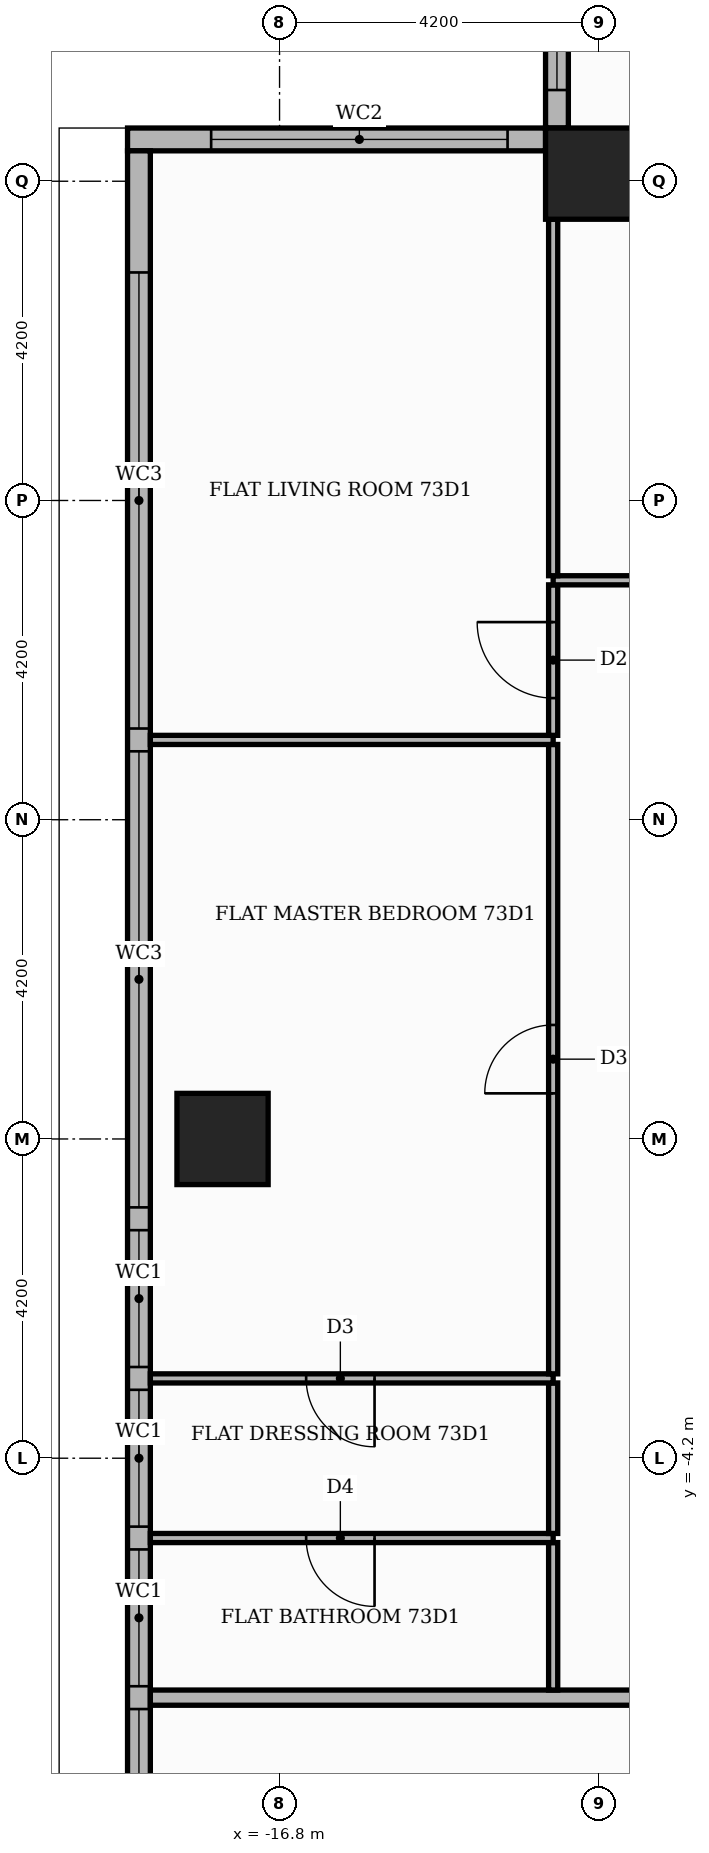
"""IFC4 building model, lengths in metres.
Left out: names, types, materials, properties, quantities, classifications, styles, units other than length and angle.
Written with IfcOpenShell. Run it as: python <this file> out.ifc"""

import sys

from ifc_helpers import new_model, si_unit, direction, frame, frame_2d, origin, origin_2d, place, context, subcontext, project, spatial, rectangle, extrude, element, fill, save


model = new_model("IFC4")
c1 = context("Model", 3, precision=1e-05, world=origin(), true_north=direction((0.0, 1.0)))
c2 = subcontext(c1, "Body", "Model", "MODEL_VIEW")
j1 = project(units=[si_unit("LENGTHUNIT", "METRE"), si_unit("PLANEANGLEUNIT", "RADIAN")], contexts=[c1])
p1 = place(None, origin())
s1 = spatial("IfcSite", under=j1, at=p1, CompositionType="ELEMENT")
p2 = place(p1, origin())
s2 = spatial("IfcBuilding", under=s1, at=p2, CompositionType="ELEMENT")
p3 = place(p2, frame((0.0, 0.0, 304.5)))
s3 = spatial("IfcBuildingStorey", under=s2, at=p3, CompositionType="ELEMENT", Elevation=304.5)
for number, where, z_axis, x_axis in (
    (1, (-17.55, 0.0, 0.0), (0.0, 0.0, 1.0), (1.0, 0.0, 0.0)),
    (2, (-12.7, 12.7, 0.0), (0.0, 0.0, 1.0), (1.0, 0.0, 0.0)),
):
    element("IfcColumn", number, at=place(p3, frame(where, z_axis=z_axis, x_axis=x_axis)), inside=s3, PredefinedType="COLUMN", context=c2, shape_type="SweptSolid", body=[
        extrude(rectangle(XDim=1.2, YDim=1.2, at=origin_2d()), origin(), (0.0, 0.0, 1.0), 3.9),
    ])
p4 = place(p3, frame((-13.15, 18.5, 0.0), z_axis=(0.0, 0.0, 1.0), x_axis=(0.0, -1.0, 0.0)))
e3 = element("IfcWall", 3, at=p4, inside=s3, PredefinedType="STANDARD", context=c2, shape_type="SweptSolid", body=[
    extrude(rectangle(XDim=5.2, YDim=0.3, at=frame_2d((2.6, 0.0))), origin(), (0.0, 0.0, 1.0), 3.55),
])
p5 = place(p4, frame((0.8, 0.0, 0.6)))
e4 = element("IfcOpeningElement", 4, at=p5, cuts=e3, PredefinedType="OPENING", context=c2, shape_type="SweptSolid", body=[
    extrude(rectangle(XDim=3.9, YDim=2.4, at=frame_2d((1.95, 1.2))), frame((0.0, 0.16, 0.0), z_axis=(0.0, -1.0, 0.0), x_axis=(1.0, 0.0, 0.0)), (0.0, 0.0, 1.0), 0.32),
])
p6 = place(p3, frame((-13.3, 13.15, 0.0), z_axis=(0.0, 0.0, 1.0), x_axis=(-1.0, 0.0, 0.0)))
e5 = element("IfcWall", 5, at=p6, inside=s3, PredefinedType="STANDARD", context=c2, shape_type="SweptSolid", body=[
    extrude(rectangle(XDim=5.5, YDim=0.3, at=frame_2d((2.75, 0.0))), origin(), (0.0, 0.0, 1.0), 3.55),
])
p7 = place(p6, frame((0.5, 0.0, 0.6)))
e6 = element("IfcOpeningElement", 6, at=p7, cuts=e5, PredefinedType="OPENING", context=c2, shape_type="SweptSolid", body=[
    extrude(rectangle(XDim=3.9, YDim=2.4, at=frame_2d((1.95, 1.2))), frame((0.0, 0.16, 0.0), z_axis=(0.0, -1.0, 0.0), x_axis=(1.0, 0.0, 0.0)), (0.0, 0.0, 1.0), 0.32),
])
p8 = place(p3, frame((-18.65, 13.0, 0.0), z_axis=(0.0, 0.0, 1.0), x_axis=(0.0, -1.0, 0.0)))
e7 = element("IfcWall", 7, at=p8, inside=s3, PredefinedType="STANDARD", context=c2, shape_type="SweptSolid", body=[
    extrude(rectangle(XDim=26.3, YDim=0.3, at=frame_2d((13.15, 0.0))), origin(), (0.0, 0.0, 1.0), 3.55),
])
p9 = place(p8, frame((1.6, 0.0, 0.6)))
e8 = element("IfcOpeningElement", 8, at=p9, cuts=e7, PredefinedType="OPENING", context=c2, shape_type="SweptSolid", body=[
    extrude(rectangle(XDim=6.0, YDim=2.4, at=frame_2d((3.0, 1.2))), frame((0.0, 0.16, 0.0), z_axis=(0.0, -1.0, 0.0), x_axis=(1.0, 0.0, 0.0)), (0.0, 0.0, 1.0), 0.32),
])
p10 = place(p8, frame((7.9, 0.0, 0.6)))
e9 = element("IfcOpeningElement", 9, at=p10, cuts=e7, PredefinedType="OPENING", context=c2, shape_type="SweptSolid", body=[
    extrude(rectangle(XDim=6.0, YDim=2.4, at=frame_2d((3.0, 1.2))), frame((0.0, 0.16, 0.0), z_axis=(0.0, -1.0, 0.0), x_axis=(1.0, 0.0, 0.0)), (0.0, 0.0, 1.0), 0.32),
])
p11 = place(p8, frame((14.2, 0.0, 0.6)))
e10 = element("IfcOpeningElement", 10, at=p11, cuts=e7, PredefinedType="OPENING", context=c2, shape_type="SweptSolid", body=[
    extrude(rectangle(XDim=1.8, YDim=2.4, at=frame_2d((0.9, 1.2))), frame((0.0, 0.16, 0.0), z_axis=(0.0, -1.0, 0.0), x_axis=(1.0, 0.0, 0.0)), (0.0, 0.0, 1.0), 0.32),
])
p12 = place(p8, frame((16.3, 0.0, 0.6)))
e11 = element("IfcOpeningElement", 11, at=p12, cuts=e7, PredefinedType="OPENING", context=c2, shape_type="SweptSolid", body=[
    extrude(rectangle(XDim=1.8, YDim=2.4, at=frame_2d((0.9, 1.2))), frame((0.0, 0.16, 0.0), z_axis=(0.0, -1.0, 0.0), x_axis=(1.0, 0.0, 0.0)), (0.0, 0.0, 1.0), 0.32),
])
p13 = place(p8, frame((18.4, 0.0, 0.6)))
e12 = element("IfcOpeningElement", 12, at=p13, cuts=e7, PredefinedType="OPENING", context=c2, shape_type="SweptSolid", body=[
    extrude(rectangle(XDim=1.8, YDim=2.4, at=frame_2d((0.9, 1.2))), frame((0.0, 0.16, 0.0), z_axis=(0.0, -1.0, 0.0), x_axis=(1.0, 0.0, 0.0)), (0.0, 0.0, 1.0), 0.32),
])
p14 = place(p8, frame((20.5, 0.0, 0.6)))
e13 = element("IfcOpeningElement", 13, at=p14, cuts=e7, PredefinedType="OPENING", context=c2, shape_type="SweptSolid", body=[
    extrude(rectangle(XDim=3.9, YDim=2.4, at=frame_2d((1.95, 1.2))), frame((0.0, 0.16, 0.0), z_axis=(0.0, -1.0, 0.0), x_axis=(1.0, 0.0, 0.0)), (0.0, 0.0, 1.0), 0.32),
])
p15 = place(p3, frame((-18.5, -7.35, 0.0), z_axis=(0.0, 0.0, 1.0), x_axis=(1.0, 0.0, 0.0)))
e14 = element("IfcWall", 14, at=p15, inside=s3, PredefinedType="PARTITIONING", context=c2, shape_type="SweptSolid", body=[
    extrude(rectangle(XDim=25.85, YDim=0.2, at=frame_2d((12.925, 0.0))), origin(), (0.0, 0.0, 1.0), 3.55),
])
p16 = place(p15, frame((12.7, 0.0, 0.0)))
e15 = element("IfcOpeningElement", 15, at=p16, cuts=e14, PredefinedType="OPENING", context=c2, shape_type="SweptSolid", body=[
    extrude(rectangle(XDim=1.1, YDim=2.4, at=frame_2d((0.55, 1.2))), frame((0.0, 0.11, 0.0), z_axis=(0.0, -1.0, 0.0), x_axis=(1.0, 0.0, 0.0)), (0.0, 0.0, 1.0), 0.22),
])
p17 = place(p3, frame((-13.2, -7.25, 0.0), z_axis=(0.0, 0.0, 1.0), x_axis=(0.0, 1.0, 0.0)))
e16 = element("IfcWall", 16, at=p17, inside=s3, PredefinedType="PARTITIONING", context=c2, shape_type="SweptSolid", body=[
    extrude(rectangle(XDim=1.94, YDim=0.12, at=frame_2d((0.97, 0.0))), origin(), (0.0, 0.0, 1.0), 3.55),
])
p18 = place(p3, frame((-18.5, -5.25, 0.0), z_axis=(0.0, 0.0, 1.0), x_axis=(1.0, 0.0, 0.0)))
e17 = element("IfcWall", 17, at=p18, inside=s3, PredefinedType="PARTITIONING", context=c2, shape_type="SweptSolid", body=[
    extrude(rectangle(XDim=5.3, YDim=0.12, at=frame_2d((2.65, 0.0))), origin(), (0.0, 0.0, 1.0), 3.55),
])
p19 = place(p18, frame((2.05, 0.0, 0.0)))
e18 = element("IfcOpeningElement", 18, at=p19, cuts=e17, PredefinedType="OPENING", context=c2, shape_type="SweptSolid", body=[
    extrude(rectangle(XDim=0.9, YDim=2.1, at=frame_2d((0.45, 1.05))), frame((0.0, 0.07, 0.0), z_axis=(0.0, -1.0, 0.0), x_axis=(1.0, 0.0, 0.0)), (0.0, 0.0, 1.0), 0.14),
])
p20 = place(p3, frame((-13.2, -5.19, 0.0), z_axis=(0.0, 0.0, 1.0), x_axis=(0.0, 1.0, 0.0)))
e19 = element("IfcWall", 19, at=p20, inside=s3, PredefinedType="PARTITIONING", context=c2, shape_type="SweptSolid", body=[
    extrude(rectangle(XDim=1.98, YDim=0.12, at=frame_2d((0.99, 0.0))), origin(), (0.0, 0.0, 1.0), 3.55),
])
p21 = place(p3, frame((-18.5, -3.15, 0.0), z_axis=(0.0, 0.0, 1.0), x_axis=(1.0, 0.0, 0.0)))
e20 = element("IfcWall", 20, at=p21, inside=s3, PredefinedType="PARTITIONING", context=c2, shape_type="SweptSolid", body=[
    extrude(rectangle(XDim=5.3, YDim=0.12, at=frame_2d((2.65, 0.0))), origin(), (0.0, 0.0, 1.0), 3.55),
])
p22 = place(p21, frame((2.05, 0.0, 0.0)))
e21 = element("IfcOpeningElement", 21, at=p22, cuts=e20, PredefinedType="OPENING", context=c2, shape_type="SweptSolid", body=[
    extrude(rectangle(XDim=0.9, YDim=2.1, at=frame_2d((0.45, 1.05))), frame((0.0, 0.07, 0.0), z_axis=(0.0, -1.0, 0.0), x_axis=(1.0, 0.0, 0.0)), (0.0, 0.0, 1.0), 0.14),
])
p23 = place(p3, frame((-13.2, -3.09, 0.0), z_axis=(0.0, 0.0, 1.0), x_axis=(0.0, 1.0, 0.0)))
e22 = element("IfcWall", 22, at=p23, inside=s3, PredefinedType="PARTITIONING", context=c2, shape_type="SweptSolid", body=[
    extrude(rectangle(XDim=8.28, YDim=0.12, at=frame_2d((4.14, 0.0))), origin(), (0.0, 0.0, 1.0), 3.55),
])
p24 = place(p23, frame((3.69, 0.0, 0.0)))
e23 = element("IfcOpeningElement", 23, at=p24, cuts=e22, PredefinedType="OPENING", context=c2, shape_type="SweptSolid", body=[
    extrude(rectangle(XDim=0.9, YDim=2.1, at=frame_2d((0.45, 1.05))), frame((0.0, 0.07, 0.0), z_axis=(0.0, -1.0, 0.0), x_axis=(1.0, 0.0, 0.0)), (0.0, 0.0, 1.0), 0.14),
])
p25 = place(p3, frame((-18.5, 5.25, 0.0), z_axis=(0.0, 0.0, 1.0), x_axis=(1.0, 0.0, 0.0)))
e24 = element("IfcWall", 24, at=p25, inside=s3, PredefinedType="PARTITIONING", context=c2, shape_type="SweptSolid", body=[
    extrude(rectangle(XDim=5.3, YDim=0.12, at=frame_2d((2.65, 0.0))), origin(), (0.0, 0.0, 1.0), 3.55),
])
p26 = place(p3, frame((-13.2, 5.31, 0.0), z_axis=(0.0, 0.0, 1.0), x_axis=(0.0, 1.0, 0.0)))
e25 = element("IfcWall", 25, at=p26, inside=s3, PredefinedType="PARTITIONING", context=c2, shape_type="SweptSolid", body=[
    extrude(rectangle(XDim=1.98, YDim=0.12, at=frame_2d((0.99, 0.0))), origin(), (0.0, 0.0, 1.0), 3.55),
])
p27 = place(p26, frame((0.49, 0.0, 0.0)))
e26 = element("IfcOpeningElement", 26, at=p27, cuts=e25, PredefinedType="OPENING", context=c2, shape_type="SweptSolid", body=[
    extrude(rectangle(XDim=1.0, YDim=2.1, at=frame_2d((0.5, 1.05))), frame((0.0, 0.07, 0.0), z_axis=(0.0, -1.0, 0.0), x_axis=(1.0, 0.0, 0.0)), (0.0, 0.0, 1.0), 0.14),
])
p28 = place(p3, frame((-13.2, 7.35, 0.0), z_axis=(0.0, 0.0, 1.0), x_axis=(1.0, 0.0, 0.0)))
e27 = element("IfcWall", 27, at=p28, inside=s3, PredefinedType="PARTITIONING", context=c2, shape_type="SweptSolid", body=[
    extrude(rectangle(XDim=5.85, YDim=0.12, at=frame_2d((2.925, 0.0))), origin(), (0.0, 0.0, 1.0), 3.55),
])
p29 = place(p28, frame((2.475, 0.0, 0.0)))
e28 = element("IfcOpeningElement", 28, at=p29, cuts=e27, PredefinedType="OPENING", context=c2, shape_type="SweptSolid", body=[
    extrude(rectangle(XDim=0.9, YDim=2.1, at=frame_2d((0.45, 1.05))), frame((0.0, 0.07, 0.0), z_axis=(0.0, -1.0, 0.0), x_axis=(1.0, 0.0, 0.0)), (0.0, 0.0, 1.0), 0.14),
])
p30 = place(p3, frame((-13.2, 7.41, 0.0), z_axis=(0.0, 0.0, 1.0), x_axis=(0.0, 1.0, 0.0)))
e29 = element("IfcWall", 29, at=p30, inside=s3, PredefinedType="PARTITIONING", context=c2, shape_type="SweptSolid", body=[
    extrude(rectangle(XDim=4.69, YDim=0.12, at=frame_2d((2.345, 0.0))), origin(), (0.0, 0.0, 1.0), 3.55),
])
p31 = place(p5, origin())
e30 = element("IfcWindow", 30, at=p31, inside=s3, PartitioningType="SINGLE_PANEL", PredefinedType="WINDOW", context=c2, shape_type="SweptSolid", body=[
    extrude(rectangle(XDim=3.9, YDim=2.4, at=frame_2d((1.95, 1.2))), frame((0.0, 0.03, 0.0), z_axis=(0.0, -1.0, 0.0), x_axis=(1.0, 0.0, 0.0)), (0.0, 0.0, 1.0), 0.06),
])
fill(e4, e30)
p32 = place(p7, origin())
e31 = element("IfcWindow", 31, at=p32, inside=s3, PartitioningType="SINGLE_PANEL", PredefinedType="WINDOW", context=c2, shape_type="SweptSolid", body=[
    extrude(rectangle(XDim=3.9, YDim=2.4, at=frame_2d((1.95, 1.2))), frame((0.0, 0.03, 0.0), z_axis=(0.0, -1.0, 0.0), x_axis=(1.0, 0.0, 0.0)), (0.0, 0.0, 1.0), 0.06),
])
fill(e6, e31)
p33 = place(p9, origin())
e32 = element("IfcWindow", 32, at=p33, inside=s3, PartitioningType="SINGLE_PANEL", PredefinedType="WINDOW", context=c2, shape_type="SweptSolid", body=[
    extrude(rectangle(XDim=6.0, YDim=2.4, at=frame_2d((3.0, 1.2))), frame((0.0, 0.03, 0.0), z_axis=(0.0, -1.0, 0.0), x_axis=(1.0, 0.0, 0.0)), (0.0, 0.0, 1.0), 0.06),
])
fill(e8, e32)
p34 = place(p10, origin())
e33 = element("IfcWindow", 33, at=p34, inside=s3, PartitioningType="SINGLE_PANEL", PredefinedType="WINDOW", context=c2, shape_type="SweptSolid", body=[
    extrude(rectangle(XDim=6.0, YDim=2.4, at=frame_2d((3.0, 1.2))), frame((0.0, 0.03, 0.0), z_axis=(0.0, -1.0, 0.0), x_axis=(1.0, 0.0, 0.0)), (0.0, 0.0, 1.0), 0.06),
])
fill(e9, e33)
p35 = place(p11, origin())
e34 = element("IfcWindow", 34, at=p35, inside=s3, PartitioningType="SINGLE_PANEL", PredefinedType="WINDOW", context=c2, shape_type="SweptSolid", body=[
    extrude(rectangle(XDim=1.8, YDim=2.4, at=frame_2d((0.9, 1.2))), frame((0.0, 0.03, 0.0), z_axis=(0.0, -1.0, 0.0), x_axis=(1.0, 0.0, 0.0)), (0.0, 0.0, 1.0), 0.06),
])
fill(e10, e34)
p36 = place(p12, origin())
e35 = element("IfcWindow", 35, at=p36, inside=s3, PartitioningType="SINGLE_PANEL", PredefinedType="WINDOW", context=c2, shape_type="SweptSolid", body=[
    extrude(rectangle(XDim=1.8, YDim=2.4, at=frame_2d((0.9, 1.2))), frame((0.0, 0.03, 0.0), z_axis=(0.0, -1.0, 0.0), x_axis=(1.0, 0.0, 0.0)), (0.0, 0.0, 1.0), 0.06),
])
fill(e11, e35)
p37 = place(p13, origin())
e36 = element("IfcWindow", 36, at=p37, inside=s3, PartitioningType="SINGLE_PANEL", PredefinedType="WINDOW", context=c2, shape_type="SweptSolid", body=[
    extrude(rectangle(XDim=1.8, YDim=2.4, at=frame_2d((0.9, 1.2))), frame((0.0, 0.03, 0.0), z_axis=(0.0, -1.0, 0.0), x_axis=(1.0, 0.0, 0.0)), (0.0, 0.0, 1.0), 0.06),
])
fill(e12, e36)
p38 = place(p14, origin())
e37 = element("IfcWindow", 37, at=p38, inside=s3, PartitioningType="SINGLE_PANEL", PredefinedType="WINDOW", context=c2, shape_type="SweptSolid", body=[
    extrude(rectangle(XDim=3.9, YDim=2.4, at=frame_2d((1.95, 1.2))), frame((0.0, 0.03, 0.0), z_axis=(0.0, -1.0, 0.0), x_axis=(1.0, 0.0, 0.0)), (0.0, 0.0, 1.0), 0.06),
])
fill(e13, e37)
p39 = place(p27, origin())
e38 = element("IfcDoor", 38, at=p39, inside=s3, OperationType="SINGLE_SWING_RIGHT", PredefinedType="DOOR", context=c2, shape_type="SweptSolid", body=[
    extrude(rectangle(XDim=1.0, YDim=2.1, at=frame_2d((0.5, 1.05))), frame((0.0, 0.025, 0.0), z_axis=(0.0, -1.0, 0.0), x_axis=(1.0, 0.0, 0.0)), (0.0, 0.0, 1.0), 0.05),
])
fill(e26, e38)
p40 = place(p24, origin())
e39 = element("IfcDoor", 39, at=p40, inside=s3, OperationType="SINGLE_SWING_LEFT", PredefinedType="DOOR", context=c2, shape_type="SweptSolid", body=[
    extrude(rectangle(XDim=0.9, YDim=2.1, at=frame_2d((0.45, 1.05))), frame((0.0, 0.025, 0.0), z_axis=(0.0, -1.0, 0.0), x_axis=(1.0, 0.0, 0.0)), (0.0, 0.0, 1.0), 0.05),
])
fill(e23, e39)
p41 = place(p22, frame((0.9, 0.0, 0.0), z_axis=(0.0, 0.0, 1.0), x_axis=(-1.0, 0.0, 0.0)))
e40 = element("IfcDoor", 40, at=p41, inside=s3, OperationType="SINGLE_SWING_RIGHT", PredefinedType="DOOR", context=c2, shape_type="SweptSolid", body=[
    extrude(rectangle(XDim=0.9, YDim=2.1, at=frame_2d((0.45, 1.05))), frame((0.0, 0.025, 0.0), z_axis=(0.0, -1.0, 0.0), x_axis=(1.0, 0.0, 0.0)), (0.0, 0.0, 1.0), 0.05),
])
fill(e21, e40)
p42 = place(p19, frame((0.9, 0.0, 0.0), z_axis=(0.0, 0.0, 1.0), x_axis=(-1.0, 0.0, 0.0)))
e41 = element("IfcDoor", 41, at=p42, inside=s3, OperationType="SINGLE_SWING_RIGHT", PredefinedType="DOOR", context=c2, shape_type="SweptSolid", body=[
    extrude(rectangle(XDim=0.9, YDim=2.1, at=frame_2d((0.45, 1.05))), frame((0.0, 0.025, 0.0), z_axis=(0.0, -1.0, 0.0), x_axis=(1.0, 0.0, 0.0)), (0.0, 0.0, 1.0), 0.05),
])
fill(e18, e41)
save(model, sys.argv[1])
